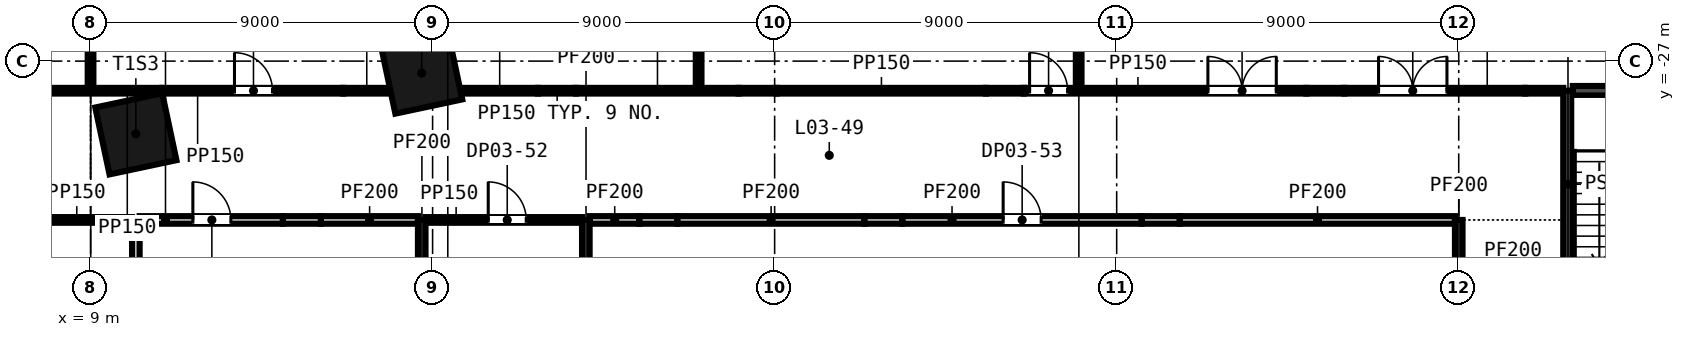
"""IFC4 building model, lengths in metres.
Left out: names, types, materials, properties, quantities, classifications, styles, units other than length and angle.
Written with IfcOpenShell. Run it as: python <this file> out.ifc"""

import sys

from ifc_helpers import new_model, si_unit, direction, frame, frame_2d, origin, origin_2d, place, context, subcontext, project, spatial, rectangle, extrude, element, fill, save


model = new_model("IFC4")
c1 = context("Model", 3, precision=1e-05, world=origin(), true_north=direction((0.0, 1.0)))
c2 = subcontext(c1, "Body", "Model", "MODEL_VIEW")
j1 = project(units=[si_unit("LENGTHUNIT", "METRE"), si_unit("PLANEANGLEUNIT", "RADIAN")], contexts=[c1])
p1 = place(None, origin())
s1 = spatial("IfcSite", under=j1, at=p1, CompositionType="ELEMENT")
p2 = place(p1, origin())
s2 = spatial("IfcBuilding", under=s1, at=p2, CompositionType="ELEMENT")
p3 = place(p2, frame((0.0, 0.0, 22.5)))
s3 = spatial("IfcBuildingStorey", under=s2, at=p3, CompositionType="ELEMENT", Elevation=22.5)
for number, where, z_axis, x_axis in (
    (1, (10.192, -28.914, -0.3), (0.0, 0.0, 1.0), (0.978, 0.208, 0.0)),
    (2, (17.714, -27.315, -0.3), (0.0, 0.0, 1.0), (0.978, 0.208, 0.0)),
):
    element("IfcColumn", number, at=place(p3, frame(where, z_axis=z_axis, x_axis=x_axis)), inside=s3, PredefinedType="COLUMN", context=c2, shape_type="SweptSolid", body=[
        extrude(rectangle(XDim=1.8, YDim=1.8, at=origin_2d()), origin(), (0.0, 0.0, 1.0), 4.5),
    ])
p4 = place(p3, frame((4.223, -31.179, 0.0), z_axis=(0.0, 0.0, 1.0), x_axis=(1.0, 0.0, 0.0)))
e3 = element("IfcWall", 3, at=p4, inside=s3, PredefinedType="PARTITIONING", context=c2, shape_type="SweptSolid", body=[
    extrude(rectangle(XDim=5.869, YDim=0.15, at=frame_2d((2.935, 0.0))), origin(), (0.0, 0.0, 1.0), 4.2),
])
p5 = place(p4, frame((1.9, 0.0, 0.0)))
e4 = element("IfcOpeningElement", 4, at=p5, cuts=e3, PredefinedType="OPENING", context=c2, shape_type="SweptSolid", body=[
    extrude(rectangle(XDim=1.0, YDim=2.1, at=frame_2d((0.5, 1.05))), frame((0.0, 0.085, 0.0), z_axis=(0.0, -1.0, 0.0), x_axis=(1.0, 0.0, 0.0)), (0.0, 0.0, 1.0), 0.17),
])
p6 = place(p3, frame((10.292, -31.179, 0.0), z_axis=(0.0, 0.0, 1.0), x_axis=(1.0, 0.0, 0.0)))
e5 = element("IfcWall", 5, at=p6, inside=s3, PredefinedType="PARTITIONING", context=c2, shape_type="SweptSolid", body=[
    extrude(rectangle(XDim=3.77, YDim=0.2, at=frame_2d((1.885, 0.0))), origin(), (0.0, 0.0, 1.0), 4.2),
])
p7 = place(p6, frame((1.4, 0.0, 0.0)))
e6 = element("IfcOpeningElement", 6, at=p7, cuts=e5, PredefinedType="OPENING", context=c2, shape_type="SweptSolid", body=[
    extrude(rectangle(XDim=1.0, YDim=2.1, at=frame_2d((0.5, 1.05))), frame((0.0, 0.11, 0.0), z_axis=(0.0, -1.0, 0.0), x_axis=(1.0, 0.0, 0.0)), (0.0, 0.0, 1.0), 0.22),
])
p8 = place(p3, frame((14.062, -31.179, 0.0), z_axis=(0.0, 0.0, 1.0), x_axis=(1.0, 0.0, 0.0)))
e7 = element("IfcWall", 7, at=p8, inside=s3, PredefinedType="PARTITIONING", context=c2, shape_type="SweptSolid", body=[
    extrude(rectangle(XDim=1.0, YDim=0.2, at=frame_2d((0.5, 0.0))), origin(), (0.0, 0.0, 1.0), 3.451),
])
p9 = place(p3, frame((15.062, -31.179, 0.0), z_axis=(0.0, 0.0, 1.0), x_axis=(1.0, 0.0, 0.0)))
e8 = element("IfcWall", 8, at=p9, inside=s3, PredefinedType="PARTITIONING", context=c2, shape_type="SweptSolid", body=[
    extrude(rectangle(XDim=2.552, YDim=0.2, at=frame_2d((1.276, 0.0))), origin(), (0.0, 0.0, 1.0), 4.2),
])
p10 = place(p3, frame((17.814, -31.179, 0.0), z_axis=(0.0, 0.0, 1.0), x_axis=(1.0, 0.0, 0.0)))
e9 = element("IfcWall", 9, at=p10, inside=s3, PredefinedType="PARTITIONING", context=c2, shape_type="SweptSolid", body=[
    extrude(rectangle(XDim=4.118, YDim=0.15, at=frame_2d((2.059, 0.0))), origin(), (0.0, 0.0, 1.0), 4.2),
])
p11 = place(p10, frame((1.65, 0.0, 0.0)))
e10 = element("IfcOpeningElement", 10, at=p11, cuts=e9, PredefinedType="OPENING", context=c2, shape_type="SweptSolid", body=[
    extrude(rectangle(XDim=1.0, YDim=2.1, at=frame_2d((0.5, 1.05))), frame((0.0, 0.085, 0.0), z_axis=(0.0, -1.0, 0.0), x_axis=(1.0, 0.0, 0.0)), (0.0, 0.0, 1.0), 0.17),
])
p12 = place(p3, frame((22.132, -31.179, 0.0), z_axis=(0.0, 0.0, 1.0), x_axis=(1.0, 0.0, 0.0)))
e11 = element("IfcWall", 11, at=p12, inside=s3, PredefinedType="PARTITIONING", context=c2, shape_type="SweptSolid", body=[
    extrude(rectangle(XDim=1.31, YDim=0.2, at=frame_2d((0.655, 0.0))), origin(), (0.0, 0.0, 1.0), 4.2),
])
p13 = place(p3, frame((23.442, -31.179, 0.0), z_axis=(0.0, 0.0, 1.0), x_axis=(1.0, 0.0, 0.0)))
e12 = element("IfcWall", 12, at=p13, inside=s3, PredefinedType="PARTITIONING", context=c2, shape_type="SweptSolid", body=[
    extrude(rectangle(XDim=1.0, YDim=0.2, at=frame_2d((0.5, 0.0))), origin(), (0.0, 0.0, 1.0), 3.298),
])
p14 = place(p3, frame((24.442, -31.179, 0.0), z_axis=(0.0, 0.0, 1.0), x_axis=(1.0, 0.0, 0.0)))
e13 = element("IfcWall", 13, at=p14, inside=s3, PredefinedType="PARTITIONING", context=c2, shape_type="SweptSolid", body=[
    extrude(rectangle(XDim=4.921, YDim=0.2, at=frame_2d((2.46, 0.0))), origin(), (0.0, 0.0, 1.0), 4.2),
])
p15 = place(p3, frame((29.363, -31.179, 0.0), z_axis=(0.0, 0.0, 1.0), x_axis=(1.0, 0.0, 0.0)))
e14 = element("IfcWall", 14, at=p15, inside=s3, PredefinedType="PARTITIONING", context=c2, shape_type="SweptSolid", body=[
    extrude(rectangle(XDim=1.0, YDim=0.2, at=frame_2d((0.5, 0.0))), origin(), (0.0, 0.0, 1.0), 3.219),
])
p16 = place(p3, frame((30.363, -31.179, 0.0), z_axis=(0.0, 0.0, 1.0), x_axis=(1.0, 0.0, 0.0)))
e15 = element("IfcWall", 15, at=p16, inside=s3, PredefinedType="PARTITIONING", context=c2, shape_type="SweptSolid", body=[
    extrude(rectangle(XDim=6.297, YDim=0.2, at=frame_2d((3.148, 0.0))), origin(), (0.0, 0.0, 1.0), 4.2),
])
p17 = place(p16, frame((2.65, 0.0, 0.0)))
e16 = element("IfcOpeningElement", 16, at=p17, cuts=e15, PredefinedType="OPENING", context=c2, shape_type="SweptSolid", body=[
    extrude(rectangle(XDim=1.0, YDim=2.1, at=frame_2d((0.5, 1.05))), frame((0.0, 0.11, 0.0), z_axis=(0.0, -1.0, 0.0), x_axis=(1.0, 0.0, 0.0)), (0.0, 0.0, 1.0), 0.22),
])
p18 = place(p3, frame((36.659, -31.179, 0.0), z_axis=(0.0, 0.0, 1.0), x_axis=(1.0, 0.0, 0.0)))
e17 = element("IfcWall", 17, at=p18, inside=s3, PredefinedType="PARTITIONING", context=c2, shape_type="SweptSolid", body=[
    extrude(rectangle(XDim=1.0, YDim=0.2, at=frame_2d((0.5, 0.0))), origin(), (0.0, 0.0, 1.0), 3.111),
])
p19 = place(p3, frame((37.659, -31.179, 0.0), z_axis=(0.0, 0.0, 1.0), x_axis=(1.0, 0.0, 0.0)))
e18 = element("IfcWall", 18, at=p19, inside=s3, PredefinedType="PARTITIONING", context=c2, shape_type="SweptSolid", body=[
    extrude(rectangle(XDim=7.241, YDim=0.2, at=frame_2d((3.62, 0.0))), origin(), (0.0, 0.0, 1.0), 4.2),
])
p20 = place(p3, frame((0.75, -27.779, 0.0), z_axis=(0.0, 0.0, 1.0), x_axis=(1.0, 0.0, 0.0)))
e19 = element("IfcWall", 19, at=p20, inside=s3, PredefinedType="PARTITIONING", context=c2, shape_type="SweptSolid", body=[
    extrude(rectangle(XDim=8.175, YDim=0.15, at=frame_2d((4.087, 0.0))), origin(), (0.0, 0.0, 1.0), 4.2),
])
p21 = place(p3, frame((9.075, -27.779, 0.0), z_axis=(0.0, 0.0, 1.0), x_axis=(1.0, 0.0, 0.0)))
e20 = element("IfcWall", 20, at=p21, inside=s3, PredefinedType="PARTITIONING", context=c2, shape_type="SweptSolid", body=[
    extrude(rectangle(XDim=1.773, YDim=0.15, at=frame_2d((0.886, 0.0))), origin(), (0.0, 0.0, 1.0), 4.2),
])
p22 = place(p3, frame((10.887, -27.779, 0.0), z_axis=(0.0, 0.0, 1.0), x_axis=(1.0, 0.0, 0.0)))
e21 = element("IfcWall", 21, at=p22, inside=s3, PredefinedType="PARTITIONING", context=c2, shape_type="SweptSolid", body=[
    extrude(rectangle(XDim=4.762, YDim=0.15, at=frame_2d((2.381, 0.0))), origin(), (0.0, 0.0, 1.0), 4.2),
])
p23 = place(p22, frame((1.9, 0.0, 0.0)))
e22 = element("IfcOpeningElement", 22, at=p23, cuts=e21, PredefinedType="OPENING", context=c2, shape_type="SweptSolid", body=[
    extrude(rectangle(XDim=1.0, YDim=2.1, at=frame_2d((0.5, 1.05))), frame((0.0, 0.085, 0.0), z_axis=(0.0, -1.0, 0.0), x_axis=(1.0, 0.0, 0.0)), (0.0, 0.0, 1.0), 0.17),
])
p24 = place(p3, frame((15.65, -27.779, 0.0), z_axis=(0.0, 0.0, 1.0), x_axis=(1.0, 0.0, 0.0)))
e23 = element("IfcWall", 23, at=p24, inside=s3, PredefinedType="PARTITIONING", context=c2, shape_type="SweptSolid", body=[
    extrude(rectangle(XDim=1.227, YDim=0.15, at=frame_2d((0.613, 0.0))), origin(), (0.0, 0.0, 1.0), 3.2),
])
p25 = place(p3, frame((18.748, -27.779, 0.0), z_axis=(0.0, 0.0, 1.0), x_axis=(1.0, 0.0, 0.0)))
e24 = element("IfcWall", 24, at=p25, inside=s3, PredefinedType="PARTITIONING", context=c2, shape_type="SweptSolid", body=[
    extrude(rectangle(XDim=2.024, YDim=0.15, at=frame_2d((1.012, 0.0))), origin(), (0.0, 0.0, 1.0), 4.2),
])
p26 = place(p3, frame((20.773, -27.779, 0.0), z_axis=(0.0, 0.0, 1.0), x_axis=(1.0, 0.0, 0.0)))
e25 = element("IfcWall", 25, at=p26, inside=s3, PredefinedType="PARTITIONING", context=c2, shape_type="SweptSolid", body=[
    extrude(rectangle(XDim=1.0, YDim=0.15, at=frame_2d((0.5, 0.0))), origin(), (0.0, 0.0, 1.0), 3.298),
])
p27 = place(p3, frame((21.773, -27.779, 0.0), z_axis=(0.0, 0.0, 1.0), x_axis=(1.0, 0.0, 0.0)))
e26 = element("IfcWall", 26, at=p27, inside=s3, PredefinedType="PARTITIONING", context=c2, shape_type="SweptSolid", body=[
    extrude(rectangle(XDim=4.279, YDim=0.15, at=frame_2d((2.14, 0.0))), origin(), (0.0, 0.0, 1.0), 4.2),
])
p28 = place(p3, frame((26.052, -27.779, 0.0), z_axis=(0.0, 0.0, 1.0), x_axis=(1.0, 0.0, 0.0)))
e27 = element("IfcWall", 27, at=p28, inside=s3, PredefinedType="PARTITIONING", context=c2, shape_type="SweptSolid", body=[
    extrude(rectangle(XDim=1.0, YDim=0.15, at=frame_2d((0.5, 0.0))), origin(), (0.0, 0.0, 1.0), 3.219),
])
p29 = place(p3, frame((27.052, -27.779, 0.0), z_axis=(0.0, 0.0, 1.0), x_axis=(1.0, 0.0, 0.0)))
e28 = element("IfcWall", 28, at=p29, inside=s3, PredefinedType="PARTITIONING", context=c2, shape_type="SweptSolid", body=[
    extrude(rectangle(XDim=5.506, YDim=0.15, at=frame_2d((2.753, 0.0))), origin(), (0.0, 0.0, 1.0), 4.2),
])
p30 = place(p3, frame((32.558, -27.779, 0.0), z_axis=(0.0, 0.0, 1.0), x_axis=(1.0, 0.0, 0.0)))
e29 = element("IfcWall", 29, at=p30, inside=s3, PredefinedType="PARTITIONING", context=c2, shape_type="SweptSolid", body=[
    extrude(rectangle(XDim=1.0, YDim=0.15, at=frame_2d((0.5, 0.0))), origin(), (0.0, 0.0, 1.0), 3.111),
])
p31 = place(p3, frame((33.558, -27.779, 0.0), z_axis=(0.0, 0.0, 1.0), x_axis=(1.0, 0.0, 0.0)))
e30 = element("IfcWall", 30, at=p31, inside=s3, PredefinedType="PARTITIONING", context=c2, shape_type="SweptSolid", body=[
    extrude(rectangle(XDim=7.432, YDim=0.15, at=frame_2d((3.716, 0.0))), origin(), (0.0, 0.0, 1.0), 4.2),
])
p32 = place(p31, frame((0.15, 0.0, 0.0)))
e31 = element("IfcOpeningElement", 31, at=p32, cuts=e30, PredefinedType="OPENING", context=c2, shape_type="SweptSolid", body=[
    extrude(rectangle(XDim=1.0, YDim=2.1, at=frame_2d((0.5, 1.05))), frame((0.0, 0.085, 0.0), z_axis=(0.0, -1.0, 0.0), x_axis=(1.0, 0.0, 0.0)), (0.0, 0.0, 1.0), 0.17),
])
p33 = place(p31, frame((4.842, 0.0, 0.0)))
e32 = element("IfcOpeningElement", 32, at=p33, cuts=e30, PredefinedType="OPENING", context=c2, shape_type="SweptSolid", body=[
    extrude(rectangle(XDim=1.8, YDim=2.4, at=frame_2d((0.9, 1.2))), frame((0.0, 0.085, 0.0), z_axis=(0.0, -1.0, 0.0), x_axis=(1.0, 0.0, 0.0)), (0.0, 0.0, 1.0), 0.17),
])
p34 = place(p3, frame((40.99, -27.779, 0.0), z_axis=(0.0, 0.0, 1.0), x_axis=(1.0, 0.0, 0.0)))
e33 = element("IfcWall", 33, at=p34, inside=s3, PredefinedType="PARTITIONING", context=c2, shape_type="SweptSolid", body=[
    extrude(rectangle(XDim=1.0, YDim=0.15, at=frame_2d((0.5, 0.0))), origin(), (0.0, 0.0, 1.0), 3.111),
])
p35 = place(p3, frame((41.99, -27.779, 0.0), z_axis=(0.0, 0.0, 1.0), x_axis=(1.0, 0.0, 0.0)))
e34 = element("IfcWall", 34, at=p35, inside=s3, PredefinedType="PARTITIONING", context=c2, shape_type="SweptSolid", body=[
    extrude(rectangle(XDim=4.76, YDim=0.15, at=frame_2d((2.38, 0.0))), origin(), (0.0, 0.0, 1.0), 4.2),
])
p36 = place(p35, frame((0.9, 0.0, 0.0)))
e35 = element("IfcOpeningElement", 35, at=p36, cuts=e34, PredefinedType="OPENING", context=c2, shape_type="SweptSolid", body=[
    extrude(rectangle(XDim=1.8, YDim=2.4, at=frame_2d((0.9, 1.2))), frame((0.0, 0.085, 0.0), z_axis=(0.0, -1.0, 0.0), x_axis=(1.0, 0.0, 0.0)), (0.0, 0.0, 1.0), 0.17),
])
p37 = place(p3, frame((46.75, -27.779, 0.0), z_axis=(0.0, 0.0, 1.0), x_axis=(1.0, 0.0, 0.0)))
e36 = element("IfcWall", 36, at=p37, inside=s3, PredefinedType="PARTITIONING", context=c2, shape_type="SweptSolid", body=[
    extrude(rectangle(XDim=1.0, YDim=0.15, at=frame_2d((0.5, 0.0))), origin(), (0.0, 0.0, 1.0), 3.667),
])
p38 = place(p3, frame((48.0, -27.779, 0.0), z_axis=(0.0, 0.0, 1.0), x_axis=(1.0, 0.0, 0.0)))
e37 = element("IfcWall", 37, at=p38, inside=s3, PredefinedType="SHEAR", context=c2, shape_type="SweptSolid", body=[
    extrude(rectangle(XDim=3.0, YDim=0.25, at=frame_2d((1.5, 0.0))), origin(), (0.0, 0.0, 1.0), 4.2),
])
p39 = place(p3, frame((9.0, -27.778, 0.0), z_axis=(0.0, 0.0, 1.0), x_axis=(0.0, 1.0, 0.0)))
e38 = element("IfcWall", 38, at=p39, inside=s3, PredefinedType="PARTITIONING", context=c2, shape_type="SweptSolid", body=[
    extrude(rectangle(XDim=3.825, YDim=0.15, at=frame_2d((1.913, 0.0))), origin(), (0.0, 0.0, 1.0), 4.2),
])
p40 = place(p3, frame((10.192, -40.4, 0.0), z_axis=(0.0, 0.0, 1.0), x_axis=(0.0, 1.0, 0.0)))
e39 = element("IfcWall", 39, at=p40, inside=s3, PredefinedType="PARTITIONING", context=c2, shape_type="SweptSolid", body=[
    extrude(rectangle(XDim=9.221, YDim=0.2, at=frame_2d((4.61, 0.0))), origin(), (0.0, 0.0, 1.0), 4.2),
])
p41 = place(p3, frame((17.714, -37.132, 0.0), z_axis=(0.0, 0.0, 1.0), x_axis=(0.0, 1.0, 0.0)))
e40 = element("IfcWall", 40, at=p41, inside=s3, PredefinedType="PARTITIONING", context=c2, shape_type="SweptSolid", body=[
    extrude(rectangle(XDim=5.953, YDim=0.2, at=frame_2d((2.976, 0.0))), origin(), (0.0, 0.0, 1.0), 4.2),
])
p42 = place(p3, frame((22.032, -35.624, 0.0), z_axis=(0.0, 0.0, 1.0), x_axis=(0.0, 1.0, 0.0)))
e41 = element("IfcWall", 41, at=p42, inside=s3, PredefinedType="PARTITIONING", context=c2, shape_type="SweptSolid", body=[
    extrude(rectangle(XDim=4.445, YDim=0.2, at=frame_2d((2.222, 0.0))), origin(), (0.0, 0.0, 1.0), 4.2),
])
p43 = place(p3, frame((25.0, -27.704, 0.0), z_axis=(0.0, 0.0, 1.0), x_axis=(0.0, 1.0, 0.0)))
e42 = element("IfcWall", 42, at=p43, inside=s3, PredefinedType="PARTITIONING", context=c2, shape_type="SweptSolid", body=[
    extrude(rectangle(XDim=1.019, YDim=0.15, at=frame_2d((0.509, 0.0))), origin(), (0.0, 0.0, 1.0), 4.2),
])
p44 = place(p3, frame((35.0, -27.704, 0.0), z_axis=(0.0, 0.0, 1.0), x_axis=(0.0, 1.0, 0.0)))
e43 = element("IfcWall", 43, at=p44, inside=s3, PredefinedType="PARTITIONING", context=c2, shape_type="SweptSolid", body=[
    extrude(rectangle(XDim=3.731, YDim=0.15, at=frame_2d((1.865, 0.0))), origin(), (0.0, 0.0, 1.0), 4.2),
])
p45 = place(p3, frame((45.0, -34.6, 0.0), z_axis=(0.0, 0.0, 1.0), x_axis=(0.0, 1.0, 0.0)))
e44 = element("IfcWall", 44, at=p45, inside=s3, PredefinedType="PARTITIONING", context=c2, shape_type="SweptSolid", body=[
    extrude(rectangle(XDim=3.421, YDim=0.2, at=frame_2d((1.71, 0.0))), origin(), (0.0, 0.0, 1.0), 4.2),
])
p46 = place(p3, frame((47.875, -34.6, 0.0), z_axis=(0.0, 0.0, 1.0), x_axis=(0.0, 1.0, 0.0)))
e45 = element("IfcWall", 45, at=p46, inside=s3, PredefinedType="SHEAR", context=c2, shape_type="SweptSolid", body=[
    extrude(rectangle(XDim=6.821, YDim=0.25, at=frame_2d((3.411, 0.0))), origin(), (0.0, 0.0, 1.0), 4.2),
])
p47 = place(p46, frame((0.65, 0.0, 0.0)))
e46 = element("IfcOpeningElement", 46, at=p47, cuts=e45, PredefinedType="OPENING", context=c2, shape_type="SweptSolid", body=[
    extrude(rectangle(XDim=1.2, YDim=2.1, at=frame_2d((0.6, 1.05))), frame((0.0, 0.135, 0.0), z_axis=(0.0, -1.0, 0.0), x_axis=(1.0, 0.0, 0.0)), (0.0, 0.0, 1.0), 0.27),
])
p48 = place(p23, origin())
e47 = element("IfcDoor", 47, at=p48, inside=s3, OperationType="SINGLE_SWING_LEFT", PredefinedType="DOOR", context=c2, shape_type="SweptSolid", body=[
    extrude(rectangle(XDim=1.0, YDim=2.1, at=frame_2d((0.5, 1.05))), frame((0.0, 0.025, 0.0), z_axis=(0.0, -1.0, 0.0), x_axis=(1.0, 0.0, 0.0)), (0.0, 0.0, 1.0), 0.05),
])
fill(e22, e47)
p49 = place(p32, origin())
e48 = element("IfcDoor", 48, at=p49, inside=s3, OperationType="SINGLE_SWING_LEFT", PredefinedType="DOOR", context=c2, shape_type="SweptSolid", body=[
    extrude(rectangle(XDim=1.0, YDim=2.1, at=frame_2d((0.5, 1.05))), frame((0.0, 0.025, 0.0), z_axis=(0.0, -1.0, 0.0), x_axis=(1.0, 0.0, 0.0)), (0.0, 0.0, 1.0), 0.05),
])
fill(e31, e48)
p50 = place(p33, origin())
e49 = element("IfcDoor", 49, at=p50, inside=s3, OperationType="SINGLE_SWING_LEFT", PredefinedType="DOOR", context=c2, shape_type="SweptSolid", body=[
    extrude(rectangle(XDim=1.8, YDim=2.4, at=frame_2d((0.9, 1.2))), frame((0.0, 0.025, 0.0), z_axis=(0.0, -1.0, 0.0), x_axis=(1.0, 0.0, 0.0)), (0.0, 0.0, 1.0), 0.05),
])
fill(e32, e49)
p51 = place(p36, origin())
e50 = element("IfcDoor", 50, at=p51, inside=s3, OperationType="SINGLE_SWING_LEFT", PredefinedType="DOOR", context=c2, shape_type="SweptSolid", body=[
    extrude(rectangle(XDim=1.8, YDim=2.4, at=frame_2d((0.9, 1.2))), frame((0.0, 0.025, 0.0), z_axis=(0.0, -1.0, 0.0), x_axis=(1.0, 0.0, 0.0)), (0.0, 0.0, 1.0), 0.05),
])
fill(e35, e50)
p52 = place(p7, origin())
e51 = element("IfcDoor", 51, at=p52, inside=s3, OperationType="SINGLE_SWING_LEFT", PredefinedType="DOOR", context=c2, shape_type="SweptSolid", body=[
    extrude(rectangle(XDim=1.0, YDim=2.1, at=frame_2d((0.5, 1.05))), frame((0.0, 0.025, 0.0), z_axis=(0.0, -1.0, 0.0), x_axis=(1.0, 0.0, 0.0)), (0.0, 0.0, 1.0), 0.05),
])
fill(e6, e51)
p53 = place(p11, origin())
e52 = element("IfcDoor", 52, at=p53, inside=s3, OperationType="SINGLE_SWING_LEFT", PredefinedType="DOOR", context=c2, shape_type="SweptSolid", body=[
    extrude(rectangle(XDim=1.0, YDim=2.1, at=frame_2d((0.5, 1.05))), frame((0.0, 0.025, 0.0), z_axis=(0.0, -1.0, 0.0), x_axis=(1.0, 0.0, 0.0)), (0.0, 0.0, 1.0), 0.05),
])
fill(e10, e52)
p54 = place(p17, origin())
e53 = element("IfcDoor", 53, at=p54, inside=s3, OperationType="SINGLE_SWING_LEFT", PredefinedType="DOOR", context=c2, shape_type="SweptSolid", body=[
    extrude(rectangle(XDim=1.0, YDim=2.1, at=frame_2d((0.5, 1.05))), frame((0.0, 0.025, 0.0), z_axis=(0.0, -1.0, 0.0), x_axis=(1.0, 0.0, 0.0)), (0.0, 0.0, 1.0), 0.05),
])
fill(e16, e53)
save(model, sys.argv[1])
